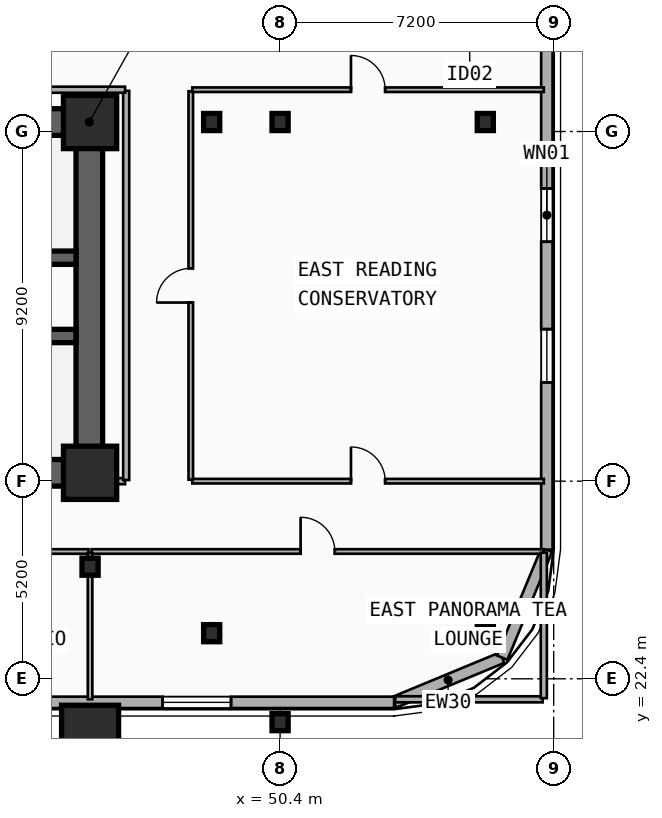
"""IFC4 building model, lengths in metres.
Left out: names, types, materials, properties, quantities, classifications, styles, units other than length and angle.
Written with IfcOpenShell. Run it as: python <this file> out.ifc"""

import sys

from ifc_helpers import new_model, si_unit, direction, frame, frame_2d, origin, origin_2d, place, context, subcontext, project, spatial, rectangle, i_section, extrude, element, fill, save


model = new_model("IFC4")
c1 = context("Model", 3, precision=1e-05, world=origin(), true_north=direction((0.0, 1.0)))
c2 = subcontext(c1, "Body", "Model", "MODEL_VIEW")
j1 = project(units=[si_unit("LENGTHUNIT", "METRE"), si_unit("PLANEANGLEUNIT", "RADIAN")], contexts=[c1])
p1 = place(None, origin())
s1 = spatial("IfcSite", under=j1, at=p1, CompositionType="ELEMENT")
p2 = place(p1, origin())
s2 = spatial("IfcBuilding", under=s1, at=p2, CompositionType="ELEMENT")
p3 = place(p2, frame((0.0, 0.0, 57.0)))
s3 = spatial("IfcBuildingStorey", under=s2, at=p3, CompositionType="ELEMENT", Elevation=57.0)
p4 = place(p3, frame((12.15, 37.05, 0.0), z_axis=(0.0, 0.0, 1.0), x_axis=(1.0, 0.0, 0.0)))
e1 = element("IfcWall", 1, at=p4, inside=s3, PredefinedType="SHEAR", context=c2, shape_type="SweptSolid", body=[
    extrude(rectangle(XDim=33.23, YDim=0.7, at=frame_2d((16.615, 0.0))), origin(), (0.0, 0.0, 1.0), 3.5),
])
p5 = place(p3, frame((45.38, 27.82, 0.0), z_axis=(0.0, 0.0, 1.0), x_axis=(-1.0, 0.0, 0.0)))
e2 = element("IfcWall", 2, at=p5, inside=s3, PredefinedType="SHEAR", context=c2, shape_type="SweptSolid", body=[
    extrude(rectangle(XDim=12.23, YDim=0.7, at=frame_2d((6.115, 0.0))), origin(), (0.0, 0.0, 1.0), 3.5),
])
p6 = place(p5, frame((9.93, 0.0, 0.0)))
e3 = element("IfcOpeningElement", 3, at=p6, cuts=e2, PredefinedType="OPENING", context=c2, shape_type="SweptSolid", body=[
    extrude(rectangle(XDim=1.1, YDim=2.15, at=frame_2d((0.55, 1.075))), frame((0.0, 0.36, 0.0), z_axis=(0.0, -1.0, 0.0), x_axis=(1.0, 0.0, 0.0)), (0.0, 0.0, 1.0), 0.72),
])
p7 = place(p5, frame((6.23, 0.0, 0.0)))
e4 = element("IfcOpeningElement", 4, at=p7, cuts=e2, PredefinedType="OPENING", context=c2, shape_type="SweptSolid", body=[
    extrude(rectangle(XDim=1.1, YDim=2.15, at=frame_2d((0.55, 1.075))), frame((0.0, 0.36, 0.0), z_axis=(0.0, -1.0, 0.0), x_axis=(1.0, 0.0, 0.0)), (0.0, 0.0, 1.0), 0.72),
])
p8 = place(p3, frame((45.38, 28.17, 0.0), z_axis=(0.0, 0.0, 1.0), x_axis=(0.0, 1.0, 0.0)))
e5 = element("IfcWall", 5, at=p8, inside=s3, PredefinedType="SHEAR", context=c2, shape_type="SweptSolid", body=[
    extrude(rectangle(XDim=8.53, YDim=0.7, at=frame_2d((4.265, 0.0))), origin(), (0.0, 0.0, 1.0), 3.5),
])
p9 = place(p3, frame((45.03, 33.48, 0.0), z_axis=(0.0, 0.0, 1.0), x_axis=(-1.0, 0.0, 0.0)))
e6 = element("IfcWall", 6, at=p9, inside=s3, PredefinedType="SHEAR", context=c2, shape_type="SweptSolid", body=[
    extrude(rectangle(XDim=8.475, YDim=0.35, at=frame_2d((4.238, 0.0))), origin(), (0.0, 0.0, 1.0), 3.5),
])
p10 = place(p9, frame((7.13, 0.0, 0.0)))
e7 = element("IfcOpeningElement", 7, at=p10, cuts=e6, PredefinedType="OPENING", context=c2, shape_type="SweptSolid", body=[
    extrude(rectangle(XDim=1.1, YDim=2.15, at=frame_2d((0.55, 1.075))), frame((0.0, 0.185, 0.0), z_axis=(0.0, -1.0, 0.0), x_axis=(1.0, 0.0, 0.0)), (0.0, 0.0, 1.0), 0.37),
])
p11 = place(p3, frame((36.555, 31.42, 0.0), z_axis=(0.0, 0.0, 1.0), x_axis=(1.0, 0.0, 0.0)))
e8 = element("IfcWall", 8, at=p11, inside=s3, PredefinedType="SHEAR", context=c2, shape_type="SweptSolid", body=[
    extrude(rectangle(XDim=8.475, YDim=0.35, at=frame_2d((4.238, 0.0))), origin(), (0.0, 0.0, 1.0), 3.5),
])
for number, where, z_axis, x_axis in (
    (9, (45.4, 27.82, 0.0), (0.0, 0.0, 1.0), (1.0, 0.0, 0.0)),
    (10, (45.4, 37.05, 0.0), (0.0, 0.0, 1.0), (1.0, 0.0, 0.0)),
):
    element("IfcColumn", number, at=place(p3, frame(where, z_axis=z_axis, x_axis=x_axis)), inside=s3, PredefinedType="COLUMN", context=c2, shape_type="SweptSolid", body=[
        extrude(rectangle(XDim=1.4, YDim=1.4, at=origin_2d()), origin(), (0.0, 0.0, 1.0), 3.5),
    ])
p12 = place(p3, frame((45.4, 25.35, 0.0), z_axis=(0.0, 0.0, 1.0), x_axis=(1.0, 0.0, 0.0)))
e11 = element("IfcColumn", 11, at=p12, inside=s3, PredefinedType="COLUMN", context=c2, shape_type="SweptSolid", body=[
    extrude(i_section(OverallWidth=0.424, OverallDepth=0.45, WebThickness=0.041, FlangeThickness=0.065, FilletRadius=0.015, at=origin_2d()), origin(), (0.0, 0.0, 1.0), 3.5),
])
p13 = place(p3, frame((45.4, 21.062, 0.0), z_axis=(0.0, -0.090172444535, 0.995926167066), x_axis=(1.0, 0.0, 0.0)))
e12 = element("IfcColumn", 12, at=p13, inside=s3, PredefinedType="COLUMN", context=c2, shape_type="SweptSolid", body=[
    extrude(rectangle(XDim=1.5, YDim=1.5, at=origin_2d()), origin(), (0.0, 0.0, 1.0), 3.514),
])
for number, where, z_axis, x_axis in (
    (13, (48.6, 23.6, 0.0), (0.0, 0.0, 1.0), (1.0, 0.0, 0.0)),
    (14, (48.6, 37.05, 0.0), (0.0, 0.0, 1.0), (1.0, 0.0, 0.0)),
):
    element("IfcColumn", number, at=place(p3, frame(where, z_axis=z_axis, x_axis=x_axis)), inside=s3, PredefinedType="COLUMN", context=c2, shape_type="SweptSolid", body=[
        extrude(i_section(OverallWidth=0.424, OverallDepth=0.45, WebThickness=0.041, FlangeThickness=0.065, FilletRadius=0.015, at=origin_2d()), origin(), (0.0, 0.0, 1.0), 3.5),
    ])
p14 = place(p3, frame((50.4, 21.356, 0.0), z_axis=(0.0, -0.079891690793, 0.996803550226), x_axis=(1.0, 0.0, 0.0)))
e15 = element("IfcColumn", 15, at=p14, inside=s3, PredefinedType="COLUMN", context=c2, shape_type="SweptSolid", body=[
    extrude(i_section(OverallWidth=0.424, OverallDepth=0.45, WebThickness=0.041, FlangeThickness=0.065, FilletRadius=0.015, at=origin_2d()), origin(), (0.0, 0.0, 1.0), 3.511),
])
for number, where, z_axis, x_axis in (
    (16, (50.4, 37.05, 0.0), (0.0, 0.0, 1.0), (1.0, 0.0, 0.0)),
    (17, (55.8, 23.6, 0.0), (0.0, 0.0, 1.0), (1.0, 0.0, 0.0)),
    (18, (55.8, 37.05, 0.0), (0.0, 0.0, 1.0), (1.0, 0.0, 0.0)),
):
    element("IfcColumn", number, at=place(p3, frame(where, z_axis=z_axis, x_axis=x_axis)), inside=s3, PredefinedType="COLUMN", context=c2, shape_type="SweptSolid", body=[
        extrude(i_section(OverallWidth=0.424, OverallDepth=0.45, WebThickness=0.041, FlangeThickness=0.065, FilletRadius=0.015, at=origin_2d()), origin(), (0.0, 0.0, 1.0), 3.5),
    ])
p15 = place(p3, frame((56.243, 22.958, 0.0), z_axis=(0.0, 0.0, 1.0), x_axis=(-0.923882414032, -0.382676475685, 0.0)))
e19 = element("IfcWall", 19, at=p15, inside=s3, PredefinedType="SOLIDWALL", context=c2, shape_type="SweptSolid", body=[
    extrude(rectangle(XDim=3.077, YDim=0.3, at=frame_2d((1.539, 0.0))), origin(), (0.0, 0.0, 1.0), 3.24),
])
p16 = place(p3, frame((57.42, 25.8, 0.0), z_axis=(0.0, 0.0, 1.0), x_axis=(-0.382636798336, -0.92389884758, 0.0)))
e20 = element("IfcWall", 20, at=p16, inside=s3, PredefinedType="SOLIDWALL", context=c2, shape_type="SweptSolid", body=[
    extrude(rectangle(XDim=3.077, YDim=0.3, at=frame_2d((1.538, 0.0))), origin(), (0.0, 0.0, 1.0), 3.24),
])
p17 = place(p3, frame((57.42, 41.0, 0.0), z_axis=(0.0, 0.0, 1.0), x_axis=(0.0, -1.0, 0.0)))
e21 = element("IfcWall", 21, at=p17, inside=s3, PredefinedType="SOLIDWALL", context=c2, shape_type="SweptSolid", body=[
    extrude(rectangle(XDim=15.2, YDim=0.3, at=frame_2d((7.6, 0.0))), origin(), (0.0, 0.0, 1.0), 3.24),
])
p18 = place(p17, frame((5.7, 0.0, 0.48)))
e22 = element("IfcOpeningElement", 22, at=p18, cuts=e21, PredefinedType="OPENING", context=c2, shape_type="SweptSolid", body=[
    extrude(rectangle(XDim=1.4, YDim=1.8, at=frame_2d((0.7, 0.9))), frame((0.0, 0.16, 0.0), z_axis=(0.0, -1.0, 0.0), x_axis=(1.0, 0.0, 0.0)), (0.0, 0.0, 1.0), 0.32),
])
p19 = place(p17, frame((9.4, 0.0, 0.48)))
e23 = element("IfcOpeningElement", 23, at=p19, cuts=e21, PredefinedType="OPENING", context=c2, shape_type="SweptSolid", body=[
    extrude(rectangle(XDim=1.4, YDim=1.8, at=frame_2d((0.7, 0.9))), frame((0.0, 0.16, 0.0), z_axis=(0.0, -1.0, 0.0), x_axis=(1.0, 0.0, 0.0)), (0.0, 0.0, 1.0), 0.32),
])
p20 = place(p3, frame((53.4, 21.78, 0.0), z_axis=(0.0, 0.0, 1.0), x_axis=(-1.0, 0.0, 0.0)))
e24 = element("IfcWall", 24, at=p20, inside=s3, PredefinedType="SOLIDWALL", context=c2, shape_type="SweptSolid", body=[
    extrude(rectangle(XDim=49.2, YDim=0.3, at=frame_2d((24.6, 0.0))), origin(), (0.0, 0.0, 1.0), 2.72),
])
p21 = place(p20, frame((43.109, 0.0, 0.74)))
e25 = element("IfcOpeningElement", 25, at=p21, cuts=e24, PredefinedType="OPENING", context=c2, shape_type="SweptSolid", body=[
    extrude(rectangle(XDim=1.8, YDim=1.8, at=frame_2d((0.9, 0.9))), frame((0.0, 0.16, 0.0), z_axis=(0.0, -1.0, 0.0), x_axis=(1.0, 0.0, 0.0)), (0.0, 0.0, 1.0), 0.32),
])
p22 = place(p20, frame((38.948, 0.0, 0.48)))
e26 = element("IfcOpeningElement", 26, at=p22, cuts=e24, PredefinedType="OPENING", context=c2, shape_type="SweptSolid", body=[
    extrude(rectangle(XDim=1.2, YDim=1.5, at=frame_2d((0.6, 0.75))), frame((0.0, 0.16, 0.0), z_axis=(0.0, -1.0, 0.0), x_axis=(1.0, 0.0, 0.0)), (0.0, 0.0, 1.0), 0.32),
])
p23 = place(p20, frame((14.798, 0.0, 0.48)))
e27 = element("IfcOpeningElement", 27, at=p23, cuts=e24, PredefinedType="OPENING", context=c2, shape_type="SweptSolid", body=[
    extrude(rectangle(XDim=1.2, YDim=1.5, at=frame_2d((0.6, 0.75))), frame((0.0, 0.16, 0.0), z_axis=(0.0, -1.0, 0.0), x_axis=(1.0, 0.0, 0.0)), (0.0, 0.0, 1.0), 0.32),
])
p24 = place(p20, frame((4.291, 0.0, 0.74)))
e28 = element("IfcOpeningElement", 28, at=p24, cuts=e24, PredefinedType="OPENING", context=c2, shape_type="SweptSolid", body=[
    extrude(rectangle(XDim=1.8, YDim=1.8, at=frame_2d((0.9, 0.9))), frame((0.0, 0.16, 0.0), z_axis=(0.0, -1.0, 0.0), x_axis=(1.0, 0.0, 0.0)), (0.0, 0.0, 1.0), 0.32),
])
p25 = place(p3, frame((48.09, 27.6, 0.0), z_axis=(0.0, 0.0, 1.0), x_axis=(1.0, 0.0, 0.0)))
e29 = element("IfcWall", 29, at=p25, inside=s3, PredefinedType="PARTITIONING", context=c2, shape_type="SweptSolid", body=[
    extrude(rectangle(XDim=9.25, YDim=0.12, at=frame_2d((4.625, 0.0))), origin(), (0.0, 0.0, 1.0), 2.57),
])
p26 = place(p25, frame((4.175, 0.0, 0.0)))
e30 = element("IfcOpeningElement", 30, at=p26, cuts=e29, PredefinedType="OPENING", context=c2, shape_type="SweptSolid", body=[
    extrude(rectangle(XDim=0.9, YDim=2.1, at=frame_2d((0.45, 1.05))), frame((0.0, 0.07, 0.0), z_axis=(0.0, -1.0, 0.0), x_axis=(1.0, 0.0, 0.0)), (0.0, 0.0, 1.0), 0.14),
])
p27 = place(p3, frame((34.84, 25.75, 0.0), z_axis=(0.0, 0.0, 1.0), x_axis=(1.0, 0.0, 0.0)))
e31 = element("IfcWall", 31, at=p27, inside=s3, PredefinedType="PARTITIONING", context=c2, shape_type="SweptSolid", body=[
    extrude(rectangle(XDim=10.52, YDim=0.12, at=frame_2d((5.26, 0.0))), origin(), (0.0, 0.0, 1.0), 2.31),
])
p28 = place(p27, frame((4.81, 0.0, 0.0)))
e32 = element("IfcOpeningElement", 32, at=p28, cuts=e31, PredefinedType="OPENING", context=c2, shape_type="SweptSolid", body=[
    extrude(rectangle(XDim=0.9, YDim=2.1, at=frame_2d((0.45, 1.05))), frame((0.0, 0.07, 0.0), z_axis=(0.0, -1.0, 0.0), x_axis=(1.0, 0.0, 0.0)), (0.0, 0.0, 1.0), 0.14),
])
p29 = place(p3, frame((45.44, 25.75, 0.0), z_axis=(0.0, 0.0, 1.0), x_axis=(1.0, 0.0, 0.0)))
e33 = element("IfcWall", 33, at=p29, inside=s3, PredefinedType="PARTITIONING", context=c2, shape_type="SweptSolid", body=[
    extrude(rectangle(XDim=11.9, YDim=0.12, at=frame_2d((5.95, 0.0))), origin(), (0.0, 0.0, 1.0), 2.31),
])
p30 = place(p29, frame((5.5, 0.0, 0.0)))
e34 = element("IfcOpeningElement", 34, at=p30, cuts=e33, PredefinedType="OPENING", context=c2, shape_type="SweptSolid", body=[
    extrude(rectangle(XDim=0.9, YDim=2.1, at=frame_2d((0.45, 1.05))), frame((0.0, 0.07, 0.0), z_axis=(0.0, -1.0, 0.0), x_axis=(1.0, 0.0, 0.0)), (0.0, 0.0, 1.0), 0.14),
])
p31 = place(p3, frame((48.05, 27.64, 0.0), z_axis=(0.0, 0.0, 1.0), x_axis=(0.0, 1.0, 0.0)))
e35 = element("IfcWall", 35, at=p31, inside=s3, PredefinedType="PARTITIONING", context=c2, shape_type="SweptSolid", body=[
    extrude(rectangle(XDim=10.22, YDim=0.12, at=frame_2d((5.11, 0.0))), origin(), (0.0, 0.0, 1.0), 2.72),
])
p32 = place(p31, frame((4.66, 0.0, 0.0)))
e36 = element("IfcOpeningElement", 36, at=p32, cuts=e35, PredefinedType="OPENING", context=c2, shape_type="SweptSolid", body=[
    extrude(rectangle(XDim=0.9, YDim=2.1, at=frame_2d((0.45, 1.05))), frame((0.0, 0.07, 0.0), z_axis=(0.0, -1.0, 0.0), x_axis=(1.0, 0.0, 0.0)), (0.0, 0.0, 1.0), 0.14),
])
p33 = place(p3, frame((48.09, 37.9, 0.0), z_axis=(0.0, 0.0, 1.0), x_axis=(1.0, 0.0, 0.0)))
e37 = element("IfcWall", 37, at=p33, inside=s3, PredefinedType="PARTITIONING", context=c2, shape_type="SweptSolid", body=[
    extrude(rectangle(XDim=9.25, YDim=0.12, at=frame_2d((4.625, 0.0))), origin(), (0.0, 0.0, 1.0), 3.24),
])
p34 = place(p33, frame((4.175, 0.0, 0.0)))
e38 = element("IfcOpeningElement", 38, at=p34, cuts=e37, PredefinedType="OPENING", context=c2, shape_type="SweptSolid", body=[
    extrude(rectangle(XDim=0.9, YDim=2.1, at=frame_2d((0.45, 1.05))), frame((0.0, 0.07, 0.0), z_axis=(0.0, -1.0, 0.0), x_axis=(1.0, 0.0, 0.0)), (0.0, 0.0, 1.0), 0.14),
])
p35 = place(p3, frame((45.4, 21.86, 0.0), z_axis=(0.0, 0.0, 1.0), x_axis=(0.0, 1.0, 0.0)))
e39 = element("IfcWall", 39, at=p35, inside=s3, PredefinedType="PARTITIONING", context=c2, shape_type="SweptSolid", body=[
    extrude(rectangle(XDim=3.85, YDim=0.12, at=frame_2d((1.925, 0.0))), origin(), (0.0, 0.0, 1.0), 2.31),
])
p36 = place(p3, frame((45.41, 27.6, 0.0), z_axis=(0.0, 0.0, 1.0), x_axis=(1.0, 0.0, 0.0)))
e40 = element("IfcWall", 40, at=p36, inside=s3, PredefinedType="PARTITIONING", context=c2, shape_type="SweptSolid", body=[
    extrude(rectangle(XDim=0.91, YDim=0.16, at=frame_2d((0.455, 0.0))), origin(), (0.0, 0.0, 1.0), 2.28),
])
p37 = place(p3, frame((46.35, 27.63, 0.0), z_axis=(0.0, 0.0, 1.0), x_axis=(0.0, 1.0, 0.0)))
e41 = element("IfcWall", 41, at=p37, inside=s3, PredefinedType="PARTITIONING", context=c2, shape_type="SweptSolid", body=[
    extrude(rectangle(XDim=10.24, YDim=0.16, at=frame_2d((5.12, 0.0))), origin(), (0.0, 0.0, 1.0), 2.72),
])
p38 = place(p3, frame((11.28, 37.9, 0.0), z_axis=(0.0, 0.0, 1.0), x_axis=(1.0, 0.0, 0.0)))
e42 = element("IfcWall", 42, at=p38, inside=s3, PredefinedType="PARTITIONING", context=c2, shape_type="SweptSolid", body=[
    extrude(rectangle(XDim=35.04, YDim=0.16, at=frame_2d((17.52, 0.0))), origin(), (0.0, 0.0, 1.0), 3.24),
])
p39 = place(p3, frame((53.43, 21.86, 0.0), z_axis=(0.0, 0.0, 1.0), x_axis=(1.0, 0.0, 0.0)))
e43 = element("IfcWall", 43, at=p39, inside=s3, PredefinedType="PARTITIONING", context=c2, shape_type="SweptSolid", body=[
    extrude(rectangle(XDim=3.88, YDim=0.16, at=frame_2d((1.94, 0.0))), origin(), (0.0, 0.0, 1.0), 2.72),
])
p40 = place(p3, frame((57.34, 21.89, 0.0), z_axis=(0.0, 0.0, 1.0), x_axis=(0.0, 1.0, 0.0)))
e44 = element("IfcWall", 44, at=p40, inside=s3, PredefinedType="PARTITIONING", context=c2, shape_type="SweptSolid", body=[
    extrude(rectangle(XDim=3.83, YDim=0.16, at=frame_2d((1.915, 0.0))), origin(), (0.0, 0.0, 1.0), 3.24),
])
p41 = place(p18, origin())
e45 = element("IfcWindow", 45, at=p41, inside=s3, PartitioningType="SINGLE_PANEL", PredefinedType="WINDOW", context=c2, shape_type="SweptSolid", body=[
    extrude(rectangle(XDim=1.4, YDim=1.8, at=frame_2d((0.7, 0.9))), frame((0.0, 0.03, 0.0), z_axis=(0.0, -1.0, 0.0), x_axis=(1.0, 0.0, 0.0)), (0.0, 0.0, 1.0), 0.06),
])
fill(e22, e45)
p42 = place(p19, origin())
e46 = element("IfcWindow", 46, at=p42, inside=s3, PartitioningType="SINGLE_PANEL", PredefinedType="WINDOW", context=c2, shape_type="SweptSolid", body=[
    extrude(rectangle(XDim=1.4, YDim=1.8, at=frame_2d((0.7, 0.9))), frame((0.0, 0.03, 0.0), z_axis=(0.0, -1.0, 0.0), x_axis=(1.0, 0.0, 0.0)), (0.0, 0.0, 1.0), 0.06),
])
fill(e23, e46)
p43 = place(p24, origin())
e47 = element("IfcWindow", 47, at=p43, inside=s3, PartitioningType="SINGLE_PANEL", PredefinedType="WINDOW", context=c2, shape_type="SweptSolid", body=[
    extrude(rectangle(XDim=1.8, YDim=1.8, at=frame_2d((0.9, 0.9))), frame((0.0, 0.03, 0.0), z_axis=(0.0, -1.0, 0.0), x_axis=(1.0, 0.0, 0.0)), (0.0, 0.0, 1.0), 0.06),
])
fill(e28, e47)
p44 = place(p26, origin())
e48 = element("IfcDoor", 48, at=p44, inside=s3, OperationType="SINGLE_SWING_LEFT", PredefinedType="DOOR", context=c2, shape_type="SweptSolid", body=[
    extrude(rectangle(XDim=0.9, YDim=2.1, at=frame_2d((0.45, 1.05))), frame((0.0, 0.025, 0.0), z_axis=(0.0, -1.0, 0.0), x_axis=(1.0, 0.0, 0.0)), (0.0, 0.0, 1.0), 0.05),
])
fill(e30, e48)
p45 = place(p30, origin())
e49 = element("IfcDoor", 49, at=p45, inside=s3, OperationType="SINGLE_SWING_LEFT", PredefinedType="DOOR", context=c2, shape_type="SweptSolid", body=[
    extrude(rectangle(XDim=0.9, YDim=2.1, at=frame_2d((0.45, 1.05))), frame((0.0, 0.025, 0.0), z_axis=(0.0, -1.0, 0.0), x_axis=(1.0, 0.0, 0.0)), (0.0, 0.0, 1.0), 0.05),
])
fill(e34, e49)
p46 = place(p32, origin())
e50 = element("IfcDoor", 50, at=p46, inside=s3, OperationType="SINGLE_SWING_LEFT", PredefinedType="DOOR", context=c2, shape_type="SweptSolid", body=[
    extrude(rectangle(XDim=0.9, YDim=2.1, at=frame_2d((0.45, 1.05))), frame((0.0, 0.025, 0.0), z_axis=(0.0, -1.0, 0.0), x_axis=(1.0, 0.0, 0.0)), (0.0, 0.0, 1.0), 0.05),
])
fill(e36, e50)
p47 = place(p34, origin())
e51 = element("IfcDoor", 51, at=p47, inside=s3, OperationType="SINGLE_SWING_LEFT", PredefinedType="DOOR", context=c2, shape_type="SweptSolid", body=[
    extrude(rectangle(XDim=0.9, YDim=2.1, at=frame_2d((0.45, 1.05))), frame((0.0, 0.025, 0.0), z_axis=(0.0, -1.0, 0.0), x_axis=(1.0, 0.0, 0.0)), (0.0, 0.0, 1.0), 0.05),
])
fill(e38, e51)
save(model, sys.argv[1])
